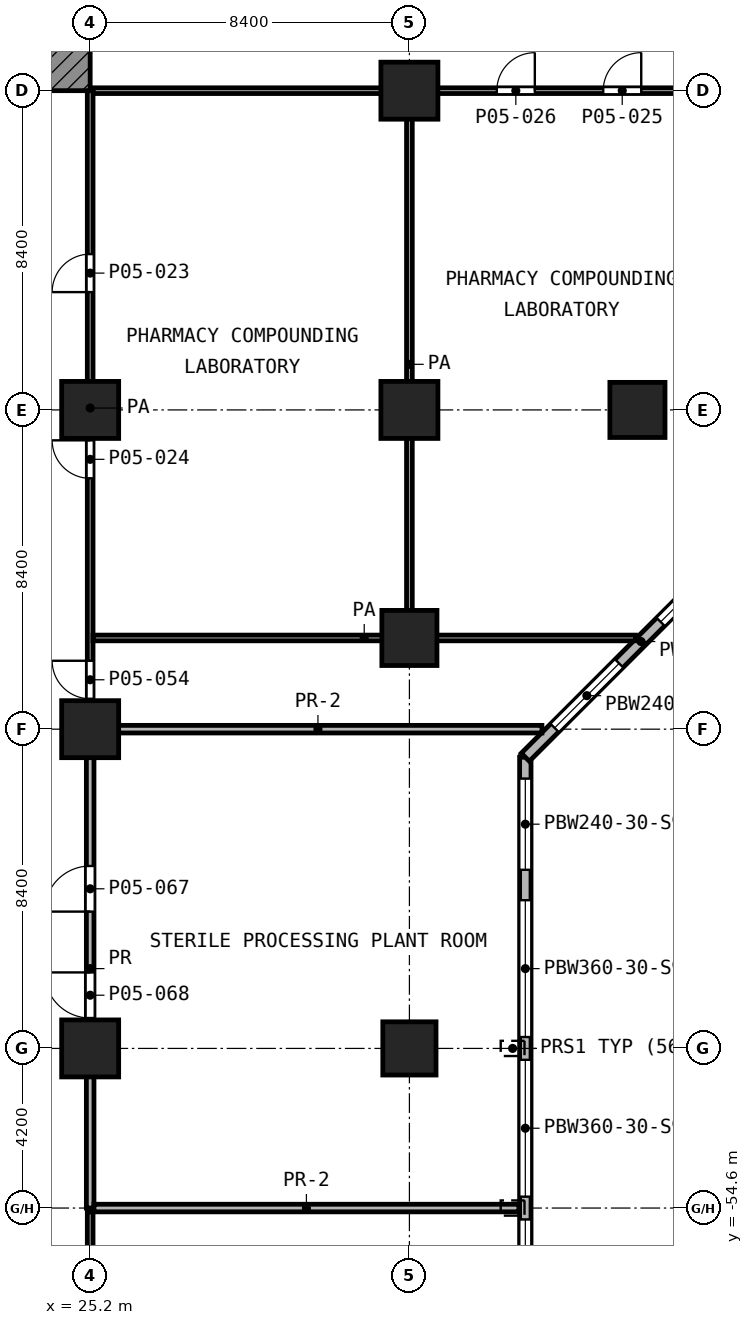
"""IFC4 building model, lengths in metres.
Left out: names, types, materials, properties, quantities, classifications, styles, units other than length and angle.
Written with IfcOpenShell. Run it as: python <this file> out.ifc"""

import sys

from ifc_helpers import new_model, si_unit, direction, frame, frame_2d, origin, origin_2d, place, context, subcontext, project, spatial, rectangle, extrude, element, fill, save


model = new_model("IFC4")
c1 = context("Model", 3, precision=1e-05, world=origin(), true_north=direction((0.0, 1.0)))
c2 = subcontext(c1, "Body", "Model", "MODEL_VIEW")
j1 = project(units=[si_unit("LENGTHUNIT", "METRE"), si_unit("PLANEANGLEUNIT", "RADIAN")], contexts=[c1])
p1 = place(None, origin())
s1 = spatial("IfcSite", under=j1, at=p1, CompositionType="ELEMENT")
p2 = place(p1, origin())
s2 = spatial("IfcBuilding", under=s1, at=p2, CompositionType="ELEMENT")
p3 = place(p2, frame((0.0, 0.0, 23.8)))
s3 = spatial("IfcBuildingStorey", under=s2, at=p3, CompositionType="ELEMENT", Elevation=23.8)
for number, where, z_axis, x_axis in (
    (1, (33.6, -25.2, 0.0), (0.0, 0.0, 1.0), (1.0, 0.0, 0.0)),
    (2, (25.2, -33.6, 0.0), (0.0, 0.0, 1.0), (1.0, 0.0, 0.0)),
    (3, (33.6, -33.6, 0.0), (0.0, 0.0, 1.0), (1.0, 0.0, 0.0)),
):
    element("IfcColumn", number, at=place(p3, frame(where, z_axis=z_axis, x_axis=x_axis)), inside=s3, PredefinedType="COLUMN", context=c2, shape_type="SweptSolid", body=[
        extrude(rectangle(XDim=1.5, YDim=1.5, at=origin_2d()), origin(), (0.0, 0.0, 1.0), 5.2),
    ])
for number, where, z_axis, x_axis in (
    (4, (39.6, -33.6, 0.0), (0.0, 0.0, 1.0), (1.0, 0.0, 0.0)),
    (5, (33.6, -39.6, 0.0), (0.0, 0.0, 1.0), (1.0, 0.0, 0.0)),
):
    element("IfcColumn", number, at=place(p3, frame(where, z_axis=z_axis, x_axis=x_axis)), inside=s3, PredefinedType="COLUMN", context=c2, shape_type="SweptSolid", body=[
        extrude(rectangle(XDim=1.45, YDim=1.45, at=origin_2d()), origin(), (0.0, 0.0, 1.0), 5.2),
    ])
for number, where, z_axis, x_axis in (
    (6, (25.2, -42.0, 0.0), (0.0, 0.0, 1.0), (1.0, 0.0, 0.0)),
    (7, (25.2, -50.4, 0.0), (0.0, 0.0, 1.0), (1.0, 0.0, 0.0)),
):
    element("IfcColumn", number, at=place(p3, frame(where, z_axis=z_axis, x_axis=x_axis)), inside=s3, PredefinedType="COLUMN", context=c2, shape_type="SweptSolid", body=[
        extrude(rectangle(XDim=1.5, YDim=1.5, at=origin_2d()), origin(), (0.0, 0.0, 1.0), 5.2),
    ])
p4 = place(p3, frame((33.6, -50.4, 0.0), z_axis=(0.0, 0.0, 1.0), x_axis=(1.0, 0.0, 0.0)))
e8 = element("IfcColumn", 8, at=p4, inside=s3, PredefinedType="COLUMN", context=c2, shape_type="SweptSolid", body=[
    extrude(rectangle(XDim=1.4, YDim=1.4, at=origin_2d()), origin(), (0.0, 0.0, 1.0), 5.2),
])
p5 = place(p3, frame((36.65, -81.138, 0.0), z_axis=(0.0, 0.0, 1.0), x_axis=(0.0, 1.0, 0.0)))
e9 = element("IfcWall", 9, at=p5, inside=s3, PredefinedType="SOLIDWALL", context=c2, shape_type="SweptSolid", body=[
    extrude(rectangle(XDim=38.4, YDim=0.3, at=frame_2d((19.2, 0.0))), origin(), (0.0, 0.0, 1.0), 4.85),
])
p6 = place(p5, frame((1.638, 0.0, 0.9)))
e10 = element("IfcOpeningElement", 10, at=p6, cuts=e9, PredefinedType="OPENING", context=c2, shape_type="SweptSolid", body=[
    extrude(rectangle(XDim=3.6, YDim=3.0, at=frame_2d((1.8, 1.5))), frame((0.0, 0.16, 0.0), z_axis=(0.0, -1.0, 0.0), x_axis=(1.0, 0.0, 0.0)), (0.0, 0.0, 1.0), 0.32),
])
p7 = place(p5, frame((5.838, 0.0, 0.9)))
e11 = element("IfcOpeningElement", 11, at=p7, cuts=e9, PredefinedType="OPENING", context=c2, shape_type="SweptSolid", body=[
    extrude(rectangle(XDim=3.6, YDim=3.0, at=frame_2d((1.8, 1.5))), frame((0.0, 0.16, 0.0), z_axis=(0.0, -1.0, 0.0), x_axis=(1.0, 0.0, 0.0)), (0.0, 0.0, 1.0), 0.32),
])
p8 = place(p5, frame((10.713, 0.0, 0.9)))
e12 = element("IfcOpeningElement", 12, at=p8, cuts=e9, PredefinedType="OPENING", context=c2, shape_type="SweptSolid", body=[
    extrude(rectangle(XDim=2.4, YDim=3.0, at=frame_2d((1.2, 1.5))), frame((0.0, 0.16, 0.0), z_axis=(0.0, -1.0, 0.0), x_axis=(1.0, 0.0, 0.0)), (0.0, 0.0, 1.0), 0.32),
])
p9 = place(p5, frame((14.613, 0.0, 0.9)))
e13 = element("IfcOpeningElement", 13, at=p9, cuts=e9, PredefinedType="OPENING", context=c2, shape_type="SweptSolid", body=[
    extrude(rectangle(XDim=2.4, YDim=3.0, at=frame_2d((1.2, 1.5))), frame((0.0, 0.16, 0.0), z_axis=(0.0, -1.0, 0.0), x_axis=(1.0, 0.0, 0.0)), (0.0, 0.0, 1.0), 0.32),
])
p10 = place(p5, frame((18.438, 0.0, 0.9)))
e14 = element("IfcOpeningElement", 14, at=p10, cuts=e9, PredefinedType="OPENING", context=c2, shape_type="SweptSolid", body=[
    extrude(rectangle(XDim=3.6, YDim=3.0, at=frame_2d((1.8, 1.5))), frame((0.0, 0.16, 0.0), z_axis=(0.0, -1.0, 0.0), x_axis=(1.0, 0.0, 0.0)), (0.0, 0.0, 1.0), 0.32),
])
p11 = place(p5, frame((22.638, 0.0, 0.9)))
e15 = element("IfcOpeningElement", 15, at=p11, cuts=e9, PredefinedType="OPENING", context=c2, shape_type="SweptSolid", body=[
    extrude(rectangle(XDim=3.6, YDim=3.0, at=frame_2d((1.8, 1.5))), frame((0.0, 0.16, 0.0), z_axis=(0.0, -1.0, 0.0), x_axis=(1.0, 0.0, 0.0)), (0.0, 0.0, 1.0), 0.32),
])
p12 = place(p5, frame((26.838, 0.0, 0.9)))
e16 = element("IfcOpeningElement", 16, at=p12, cuts=e9, PredefinedType="OPENING", context=c2, shape_type="SweptSolid", body=[
    extrude(rectangle(XDim=3.6, YDim=3.0, at=frame_2d((1.8, 1.5))), frame((0.0, 0.16, 0.0), z_axis=(0.0, -1.0, 0.0), x_axis=(1.0, 0.0, 0.0)), (0.0, 0.0, 1.0), 0.32),
])
p13 = place(p5, frame((31.038, 0.0, 0.9)))
e17 = element("IfcOpeningElement", 17, at=p13, cuts=e9, PredefinedType="OPENING", context=c2, shape_type="SweptSolid", body=[
    extrude(rectangle(XDim=3.6, YDim=3.0, at=frame_2d((1.8, 1.5))), frame((0.0, 0.16, 0.0), z_axis=(0.0, -1.0, 0.0), x_axis=(1.0, 0.0, 0.0)), (0.0, 0.0, 1.0), 0.32),
])
p14 = place(p5, frame((35.438, 0.0, 0.9)))
e18 = element("IfcOpeningElement", 18, at=p14, cuts=e9, PredefinedType="OPENING", context=c2, shape_type="SweptSolid", body=[
    extrude(rectangle(XDim=2.4, YDim=3.0, at=frame_2d((1.2, 1.5))), frame((0.0, 0.16, 0.0), z_axis=(0.0, -1.0, 0.0), x_axis=(1.0, 0.0, 0.0)), (0.0, 0.0, 1.0), 0.32),
])
p15 = place(p3, frame((36.65, -42.738, 0.0), z_axis=(0.0, 0.0, 1.0), x_axis=(0.707106781187, 0.707106781187, 0.0)))
e19 = element("IfcWall", 19, at=p15, inside=s3, PredefinedType="SOLIDWALL", context=c2, shape_type="SweptSolid", body=[
    extrude(rectangle(XDim=8.61, YDim=0.3, at=frame_2d((4.305, 0.0))), origin(), (0.0, 0.0, 1.0), 4.85),
])
p16 = place(p15, frame((1.09, 0.0, 0.9)))
e20 = element("IfcOpeningElement", 20, at=p16, cuts=e19, PredefinedType="OPENING", context=c2, shape_type="SweptSolid", body=[
    extrude(rectangle(XDim=2.4, YDim=3.0, at=frame_2d((1.2, 1.5))), frame((0.0, 0.16, 0.0), z_axis=(0.0, -1.0, 0.0), x_axis=(1.0, 0.0, 0.0)), (0.0, 0.0, 1.0), 0.32),
])
p17 = place(p15, frame((5.035, 0.0, 0.9)))
e21 = element("IfcOpeningElement", 21, at=p17, cuts=e19, PredefinedType="OPENING", context=c2, shape_type="SweptSolid", body=[
    extrude(rectangle(XDim=2.4, YDim=3.0, at=frame_2d((1.2, 1.5))), frame((0.0, 0.16, 0.0), z_axis=(0.0, -1.0, 0.0), x_axis=(1.0, 0.0, 0.0)), (0.0, 0.0, 1.0), 0.32),
])
p18 = place(p3, frame((24.6, -25.2, 0.0), z_axis=(0.0, 0.0, 1.0), x_axis=(0.0, 1.0, 0.0)))
e22 = element("IfcWall", 22, at=p18, inside=s3, PredefinedType="SHEAR", context=c2, shape_type="SweptSolid", body=[
    extrude(rectangle(XDim=1.2, YDim=1.2, at=frame_2d((0.6, 0.0))), origin(), (0.0, 0.0, 1.0), 4.85),
])
p19 = place(p3, frame((25.275, -39.6, 0.0), z_axis=(0.0, 0.0, 1.0), x_axis=(1.0, 0.0, 0.0)))
e23 = element("IfcWall", 23, at=p19, inside=s3, PredefinedType="PARTITIONING", context=c2, shape_type="SweptSolid", body=[
    extrude(rectangle(XDim=14.272, YDim=0.15, at=frame_2d((7.136, 0.0))), origin(), (0.0, 0.0, 1.0), 4.85),
])
p20 = place(p3, frame((25.275, -25.2, 0.0), z_axis=(0.0, 0.0, 1.0), x_axis=(1.0, 0.0, 0.0)))
e24 = element("IfcWall", 24, at=p20, inside=s3, PredefinedType="PARTITIONING", context=c2, shape_type="SweptSolid", body=[
    extrude(rectangle(XDim=33.425, YDim=0.15, at=frame_2d((16.712, 0.0))), origin(), (0.0, 0.0, 1.0), 4.85),
])
p21 = place(p20, frame((13.425, 0.0, 0.0)))
e25 = element("IfcOpeningElement", 25, at=p21, cuts=e24, PredefinedType="OPENING", context=c2, shape_type="SweptSolid", body=[
    extrude(rectangle(XDim=1.0, YDim=2.1, at=frame_2d((0.5, 1.05))), frame((0.0, 0.085, 0.0), z_axis=(0.0, -1.0, 0.0), x_axis=(1.0, 0.0, 0.0)), (0.0, 0.0, 1.0), 0.17),
])
p22 = place(p20, frame((10.625, 0.0, 0.0)))
e26 = element("IfcOpeningElement", 26, at=p22, cuts=e24, PredefinedType="OPENING", context=c2, shape_type="SweptSolid", body=[
    extrude(rectangle(XDim=1.0, YDim=2.1, at=frame_2d((0.5, 1.05))), frame((0.0, 0.085, 0.0), z_axis=(0.0, -1.0, 0.0), x_axis=(1.0, 0.0, 0.0)), (0.0, 0.0, 1.0), 0.17),
])
p23 = place(p20, frame((21.825, 0.0, 0.0)))
e27 = element("IfcOpeningElement", 27, at=p23, cuts=e24, PredefinedType="OPENING", context=c2, shape_type="SweptSolid", body=[
    extrude(rectangle(XDim=1.0, YDim=2.1, at=frame_2d((0.5, 1.05))), frame((0.0, 0.085, 0.0), z_axis=(0.0, -1.0, 0.0), x_axis=(1.0, 0.0, 0.0)), (0.0, 0.0, 1.0), 0.17),
])
p24 = place(p20, frame((19.025, 0.0, 0.0)))
e28 = element("IfcOpeningElement", 28, at=p24, cuts=e24, PredefinedType="OPENING", context=c2, shape_type="SweptSolid", body=[
    extrude(rectangle(XDim=1.0, YDim=2.1, at=frame_2d((0.5, 1.05))), frame((0.0, 0.085, 0.0), z_axis=(0.0, -1.0, 0.0), x_axis=(1.0, 0.0, 0.0)), (0.0, 0.0, 1.0), 0.17),
])
p25 = place(p20, frame((28.825, 0.0, 0.0)))
e29 = element("IfcOpeningElement", 29, at=p25, cuts=e24, PredefinedType="OPENING", context=c2, shape_type="SweptSolid", body=[
    extrude(rectangle(XDim=1.0, YDim=2.1, at=frame_2d((0.5, 1.05))), frame((0.0, 0.085, 0.0), z_axis=(0.0, -1.0, 0.0), x_axis=(1.0, 0.0, 0.0)), (0.0, 0.0, 1.0), 0.17),
])
p26 = place(p3, frame((25.2, -81.3, 0.0), z_axis=(0.0, 0.0, 1.0), x_axis=(0.0, 1.0, 0.0)))
e30 = element("IfcWall", 30, at=p26, inside=s3, PredefinedType="PARTITIONING", context=c2, shape_type="SweptSolid", body=[
    extrude(rectangle(XDim=26.6, YDim=0.15, at=frame_2d((13.3, 0.0))), origin(), (0.0, 0.0, 1.0), 4.85),
])
p27 = place(p26, frame((20.7, 0.0, 0.0)))
e31 = element("IfcOpeningElement", 31, at=p27, cuts=e30, PredefinedType="OPENING", context=c2, shape_type="SweptSolid", body=[
    extrude(rectangle(XDim=1.0, YDim=2.1, at=frame_2d((0.5, 1.05))), frame((0.0, 0.085, 0.0), z_axis=(0.0, -1.0, 0.0), x_axis=(1.0, 0.0, 0.0)), (0.0, 0.0, 1.0), 0.17),
])
p28 = place(p26, frame((12.25, 0.0, 0.0)))
e32 = element("IfcOpeningElement", 32, at=p28, cuts=e30, PredefinedType="OPENING", context=c2, shape_type="SweptSolid", body=[
    extrude(rectangle(XDim=1.0, YDim=2.1, at=frame_2d((0.5, 1.05))), frame((0.0, 0.085, 0.0), z_axis=(0.0, -1.0, 0.0), x_axis=(1.0, 0.0, 0.0)), (0.0, 0.0, 1.0), 0.17),
])
p29 = place(p26, frame((7.45, 0.0, 0.0)))
e33 = element("IfcOpeningElement", 33, at=p29, cuts=e30, PredefinedType="OPENING", context=c2, shape_type="SweptSolid", body=[
    extrude(rectangle(XDim=1.0, YDim=2.1, at=frame_2d((0.5, 1.05))), frame((0.0, 0.085, 0.0), z_axis=(0.0, -1.0, 0.0), x_axis=(1.0, 0.0, 0.0)), (0.0, 0.0, 1.0), 0.17),
])
p30 = place(p26, frame((3.3, 0.0, 0.0)))
e34 = element("IfcOpeningElement", 34, at=p30, cuts=e30, PredefinedType="OPENING", context=c2, shape_type="SweptSolid", body=[
    extrude(rectangle(XDim=1.0, YDim=2.1, at=frame_2d((0.5, 1.05))), frame((0.0, 0.085, 0.0), z_axis=(0.0, -1.0, 0.0), x_axis=(1.0, 0.0, 0.0)), (0.0, 0.0, 1.0), 0.17),
])
p31 = place(p26, frame((1.4, 0.0, 0.0)))
e35 = element("IfcOpeningElement", 35, at=p31, cuts=e30, PredefinedType="OPENING", context=c2, shape_type="SweptSolid", body=[
    extrude(rectangle(XDim=1.0, YDim=2.1, at=frame_2d((0.5, 1.05))), frame((0.0, 0.085, 0.0), z_axis=(0.0, -1.0, 0.0), x_axis=(1.0, 0.0, 0.0)), (0.0, 0.0, 1.0), 0.17),
])
p32 = place(p3, frame((25.2, -41.9, 0.0), z_axis=(0.0, 0.0, 1.0), x_axis=(0.0, 1.0, 0.0)))
e36 = element("IfcWall", 36, at=p32, inside=s3, PredefinedType="PARTITIONING", context=c2, shape_type="SweptSolid", body=[
    extrude(rectangle(XDim=16.7, YDim=0.15, at=frame_2d((8.35, 0.0))), origin(), (0.0, 0.0, 1.0), 4.85),
])
p33 = place(p32, frame((11.4, 0.0, 0.0)))
e37 = element("IfcOpeningElement", 37, at=p33, cuts=e36, PredefinedType="OPENING", context=c2, shape_type="SweptSolid", body=[
    extrude(rectangle(XDim=1.0, YDim=2.1, at=frame_2d((0.5, 1.05))), frame((0.0, 0.085, 0.0), z_axis=(0.0, -1.0, 0.0), x_axis=(1.0, 0.0, 0.0)), (0.0, 0.0, 1.0), 0.17),
])
p34 = place(p32, frame((6.5, 0.0, 0.0)))
e38 = element("IfcOpeningElement", 38, at=p34, cuts=e36, PredefinedType="OPENING", context=c2, shape_type="SweptSolid", body=[
    extrude(rectangle(XDim=1.0, YDim=2.1, at=frame_2d((0.5, 1.05))), frame((0.0, 0.085, 0.0), z_axis=(0.0, -1.0, 0.0), x_axis=(1.0, 0.0, 0.0)), (0.0, 0.0, 1.0), 0.17),
])
p35 = place(p32, frame((0.7, 0.0, 0.0)))
e39 = element("IfcOpeningElement", 39, at=p35, cuts=e36, PredefinedType="OPENING", context=c2, shape_type="SweptSolid", body=[
    extrude(rectangle(XDim=1.0, YDim=2.1, at=frame_2d((0.5, 1.05))), frame((0.0, 0.085, 0.0), z_axis=(0.0, -1.0, 0.0), x_axis=(1.0, 0.0, 0.0)), (0.0, 0.0, 1.0), 0.17),
])
p36 = place(p3, frame((33.6, -39.525, 0.0), z_axis=(0.0, 0.0, 1.0), x_axis=(0.0, 1.0, 0.0)))
e40 = element("IfcWall", 40, at=p36, inside=s3, PredefinedType="PARTITIONING", context=c2, shape_type="SweptSolid", body=[
    extrude(rectangle(XDim=14.25, YDim=0.15, at=frame_2d((7.125, 0.0))), origin(), (0.0, 0.0, 1.0), 4.85),
])
p37 = place(p3, frame((25.3, -54.6, 0.0), z_axis=(0.0, 0.0, 1.0), x_axis=(1.0, 0.0, 0.0)))
e41 = element("IfcWall", 41, at=p37, inside=s3, PredefinedType="PARTITIONING", context=c2, shape_type="SweptSolid", body=[
    extrude(rectangle(XDim=11.18, YDim=0.2, at=frame_2d((5.59, 0.0))), origin(), (0.0, 0.0, 1.0), 3.45),
])
p38 = place(p3, frame((25.3, -42.0, 0.0), z_axis=(0.0, 0.0, 1.0), x_axis=(1.0, 0.0, 0.0)))
e42 = element("IfcWall", 42, at=p38, inside=s3, PredefinedType="PARTITIONING", context=c2, shape_type="SweptSolid", body=[
    extrude(rectangle(XDim=11.787, YDim=0.2, at=frame_2d((5.894, 0.0))), origin(), (0.0, 0.0, 1.0), 3.45),
])
p39 = place(p3, frame((25.2, -54.6, 0.0), z_axis=(0.0, 0.0, 1.0), x_axis=(0.0, 1.0, 0.0)))
e43 = element("IfcWall", 43, at=p39, inside=s3, PredefinedType="PARTITIONING", context=c2, shape_type="SweptSolid", body=[
    extrude(rectangle(XDim=12.6, YDim=0.2, at=frame_2d((6.3, 0.0))), origin(), (0.0, 0.0, 1.0), 4.85),
])
p40 = place(p39, frame((7.8, 0.0, 0.0)))
e44 = element("IfcOpeningElement", 44, at=p40, cuts=e43, PredefinedType="OPENING", context=c2, shape_type="SweptSolid", body=[
    extrude(rectangle(XDim=1.2, YDim=2.1, at=frame_2d((0.6, 1.05))), frame((0.0, 0.11, 0.0), z_axis=(0.0, -1.0, 0.0), x_axis=(1.0, 0.0, 0.0)), (0.0, 0.0, 1.0), 0.22),
])
p41 = place(p39, frame((5.0, 0.0, 0.0)))
e45 = element("IfcOpeningElement", 45, at=p41, cuts=e43, PredefinedType="OPENING", context=c2, shape_type="SweptSolid", body=[
    extrude(rectangle(XDim=1.2, YDim=2.1, at=frame_2d((0.6, 1.05))), frame((0.0, 0.11, 0.0), z_axis=(0.0, -1.0, 0.0), x_axis=(1.0, 0.0, 0.0)), (0.0, 0.0, 1.0), 0.22),
])
p42 = place(p11, origin())
e46 = element("IfcWindow", 46, at=p42, inside=s3, PartitioningType="SINGLE_PANEL", PredefinedType="WINDOW", context=c2, shape_type="SweptSolid", body=[
    extrude(rectangle(XDim=3.6, YDim=3.0, at=frame_2d((1.8, 1.5))), frame((0.0, 0.03, 0.0), z_axis=(0.0, -1.0, 0.0), x_axis=(1.0, 0.0, 0.0)), (0.0, 0.0, 1.0), 0.06),
])
fill(e15, e46)
p43 = place(p12, origin())
e47 = element("IfcWindow", 47, at=p43, inside=s3, PartitioningType="SINGLE_PANEL", PredefinedType="WINDOW", context=c2, shape_type="SweptSolid", body=[
    extrude(rectangle(XDim=3.6, YDim=3.0, at=frame_2d((1.8, 1.5))), frame((0.0, 0.03, 0.0), z_axis=(0.0, -1.0, 0.0), x_axis=(1.0, 0.0, 0.0)), (0.0, 0.0, 1.0), 0.06),
])
fill(e16, e47)
p44 = place(p13, origin())
e48 = element("IfcWindow", 48, at=p44, inside=s3, PartitioningType="SINGLE_PANEL", PredefinedType="WINDOW", context=c2, shape_type="SweptSolid", body=[
    extrude(rectangle(XDim=3.6, YDim=3.0, at=frame_2d((1.8, 1.5))), frame((0.0, 0.03, 0.0), z_axis=(0.0, -1.0, 0.0), x_axis=(1.0, 0.0, 0.0)), (0.0, 0.0, 1.0), 0.06),
])
fill(e17, e48)
p45 = place(p14, origin())
e49 = element("IfcWindow", 49, at=p45, inside=s3, PartitioningType="SINGLE_PANEL", PredefinedType="WINDOW", context=c2, shape_type="SweptSolid", body=[
    extrude(rectangle(XDim=2.4, YDim=3.0, at=frame_2d((1.2, 1.5))), frame((0.0, 0.03, 0.0), z_axis=(0.0, -1.0, 0.0), x_axis=(1.0, 0.0, 0.0)), (0.0, 0.0, 1.0), 0.06),
])
fill(e18, e49)
p46 = place(p16, origin())
e50 = element("IfcWindow", 50, at=p46, inside=s3, PartitioningType="SINGLE_PANEL", PredefinedType="WINDOW", context=c2, shape_type="SweptSolid", body=[
    extrude(rectangle(XDim=2.4, YDim=3.0, at=frame_2d((1.2, 1.5))), frame((0.0, 0.03, 0.0), z_axis=(0.0, -1.0, 0.0), x_axis=(1.0, 0.0, 0.0)), (0.0, 0.0, 1.0), 0.06),
])
fill(e20, e50)
p47 = place(p17, origin())
e51 = element("IfcWindow", 51, at=p47, inside=s3, PartitioningType="SINGLE_PANEL", PredefinedType="WINDOW", context=c2, shape_type="SweptSolid", body=[
    extrude(rectangle(XDim=2.4, YDim=3.0, at=frame_2d((1.2, 1.5))), frame((0.0, 0.03, 0.0), z_axis=(0.0, -1.0, 0.0), x_axis=(1.0, 0.0, 0.0)), (0.0, 0.0, 1.0), 0.06),
])
fill(e21, e51)
p48 = place(p33, origin())
e52 = element("IfcDoor", 52, at=p48, inside=s3, OperationType="SINGLE_SWING_LEFT", PredefinedType="DOOR", context=c2, shape_type="SweptSolid", body=[
    extrude(rectangle(XDim=1.0, YDim=2.1, at=frame_2d((0.5, 1.05))), frame((0.0, 0.025, 0.0), z_axis=(0.0, -1.0, 0.0), x_axis=(1.0, 0.0, 0.0)), (0.0, 0.0, 1.0), 0.05),
])
fill(e37, e52)
p49 = place(p34, origin())
e53 = element("IfcDoor", 53, at=p49, inside=s3, OperationType="SINGLE_SWING_RIGHT", PredefinedType="DOOR", context=c2, shape_type="SweptSolid", body=[
    extrude(rectangle(XDim=1.0, YDim=2.1, at=frame_2d((0.5, 1.05))), frame((0.0, 0.025, 0.0), z_axis=(0.0, -1.0, 0.0), x_axis=(1.0, 0.0, 0.0)), (0.0, 0.0, 1.0), 0.05),
])
fill(e38, e53)
p50 = place(p21, origin())
e54 = element("IfcDoor", 54, at=p50, inside=s3, OperationType="SINGLE_SWING_RIGHT", PredefinedType="DOOR", context=c2, shape_type="SweptSolid", body=[
    extrude(rectangle(XDim=1.0, YDim=2.1, at=frame_2d((0.5, 1.05))), frame((0.0, 0.025, 0.0), z_axis=(0.0, -1.0, 0.0), x_axis=(1.0, 0.0, 0.0)), (0.0, 0.0, 1.0), 0.05),
])
fill(e25, e54)
p51 = place(p22, origin())
e55 = element("IfcDoor", 55, at=p51, inside=s3, OperationType="SINGLE_SWING_RIGHT", PredefinedType="DOOR", context=c2, shape_type="SweptSolid", body=[
    extrude(rectangle(XDim=1.0, YDim=2.1, at=frame_2d((0.5, 1.05))), frame((0.0, 0.025, 0.0), z_axis=(0.0, -1.0, 0.0), x_axis=(1.0, 0.0, 0.0)), (0.0, 0.0, 1.0), 0.05),
])
fill(e26, e55)
p52 = place(p35, origin())
e56 = element("IfcDoor", 56, at=p52, inside=s3, OperationType="SINGLE_SWING_RIGHT", PredefinedType="DOOR", context=c2, shape_type="SweptSolid", body=[
    extrude(rectangle(XDim=1.0, YDim=2.1, at=frame_2d((0.5, 1.05))), frame((0.0, 0.025, 0.0), z_axis=(0.0, -1.0, 0.0), x_axis=(1.0, 0.0, 0.0)), (0.0, 0.0, 1.0), 0.05),
])
fill(e39, e56)
p53 = place(p40, origin())
e57 = element("IfcDoor", 57, at=p53, inside=s3, OperationType="SINGLE_SWING_LEFT", PredefinedType="DOOR", context=c2, shape_type="SweptSolid", body=[
    extrude(rectangle(XDim=1.2, YDim=2.1, at=frame_2d((0.6, 1.05))), frame((0.0, 0.025, 0.0), z_axis=(0.0, -1.0, 0.0), x_axis=(1.0, 0.0, 0.0)), (0.0, 0.0, 1.0), 0.05),
])
fill(e44, e57)
p54 = place(p41, origin())
e58 = element("IfcDoor", 58, at=p54, inside=s3, OperationType="SINGLE_SWING_RIGHT", PredefinedType="DOOR", context=c2, shape_type="SweptSolid", body=[
    extrude(rectangle(XDim=1.2, YDim=2.1, at=frame_2d((0.6, 1.05))), frame((0.0, 0.025, 0.0), z_axis=(0.0, -1.0, 0.0), x_axis=(1.0, 0.0, 0.0)), (0.0, 0.0, 1.0), 0.05),
])
fill(e45, e58)
save(model, sys.argv[1])
